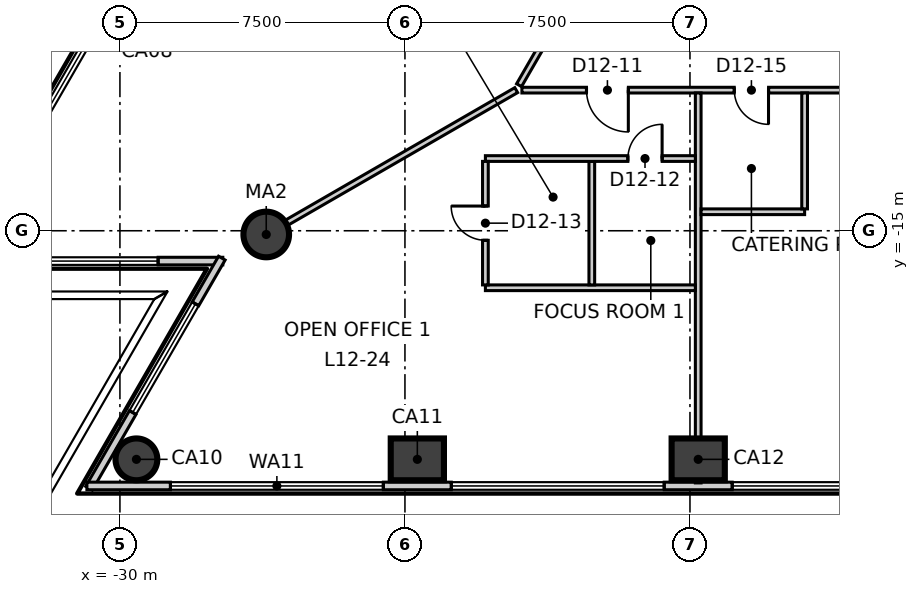
"""IFC4 building model, lengths in metres.
Left out: names, types, materials, properties, quantities, classifications, styles, units other than length and angle.
Written with IfcOpenShell. Run it as: python <this file> out.ifc"""

import sys

from ifc_helpers import new_model, si_unit, direction, frame, frame_2d, origin, origin_2d, place, context, subcontext, project, spatial, rectangle, circle, extrude, element, fill, save


model = new_model("IFC4")
c1 = context("Model", 3, precision=1e-05, world=origin(), true_north=direction((0.0, 1.0)))
c2 = subcontext(c1, "Body", "Model", "MODEL_VIEW")
j1 = project(units=[si_unit("LENGTHUNIT", "METRE"), si_unit("PLANEANGLEUNIT", "RADIAN")], contexts=[c1])
p1 = place(None, origin())
s1 = spatial("IfcSite", under=j1, at=p1, CompositionType="ELEMENT")
p2 = place(p1, origin())
s2 = spatial("IfcBuilding", under=s1, at=p2, CompositionType="ELEMENT")
p3 = place(p2, frame((0.0, 0.0, 59.3)))
s3 = spatial("IfcBuildingStorey", under=s2, at=p3, CompositionType="ELEMENT", Elevation=59.3)
p4 = place(p3, frame((-29.566, -21.015, -0.3), z_axis=(0.0, 0.0, 1.0), x_axis=(1.0, 0.0, 0.0)))
e1 = element("IfcColumn", 1, at=p4, inside=s3, PredefinedType="COLUMN", context=c2, shape_type="SweptSolid", body=[
    extrude(circle(Radius=0.55, at=origin_2d()), origin(), (0.0, 0.0, 1.0), 4.0),
])
for number, where, z_axis, x_axis in (
    (2, (-22.174, -21.015, -0.3), (0.0, 0.0, 1.0), (1.0, 0.0, 0.0)),
    (3, (-14.783, -21.015, -0.3), (0.0, 0.0, 1.0), (1.0, 0.0, 0.0)),
):
    element("IfcColumn", number, at=place(p3, frame(where, z_axis=z_axis, x_axis=x_axis)), inside=s3, PredefinedType="COLUMN", context=c2, shape_type="SweptSolid", body=[
        extrude(rectangle(XDim=1.4, YDim=1.1, at=origin_2d()), origin(), (0.0, 0.0, 1.0), 4.0),
    ])
p5 = place(p3, frame((-26.15, -15.098, -0.3), z_axis=(0.0, 0.0, 1.0), x_axis=(1.0, 0.0, 0.0)))
e4 = element("IfcColumn", 4, at=p5, inside=s3, PredefinedType="COLUMN", context=c2, shape_type="SweptSolid", body=[
    extrude(circle(Radius=0.6, at=origin_2d()), origin(), (0.0, 0.0, 1.0), 4.0),
])
p6 = place(p3, frame((-3.371, 37.591, 0.0), z_axis=(0.0, 0.0, 1.0), x_axis=(-0.500006313899, -0.866021758423, 0.0)))
e5 = element("IfcWall", 5, at=p6, inside=s3, PredefinedType="ELEMENTEDWALL", context=c2, shape_type="SweptSolid", body=[
    extrude(rectangle(XDim=61.719, YDim=0.2, at=frame_2d((30.859, 0.0))), origin(), (0.0, 0.0, 1.0), 3.7),
])
p7 = place(p6, frame((2.198, 0.0, 0.9)))
e6 = element("IfcOpeningElement", 6, at=p7, cuts=e5, PredefinedType="OPENING", context=c2, shape_type="SweptSolid", body=[
    extrude(rectangle(XDim=5.6, YDim=2.5, at=frame_2d((2.8, 1.25))), frame((0.0, 0.11, 0.0), z_axis=(0.0, -1.0, 0.0), x_axis=(1.0, 0.0, 0.0)), (0.0, 0.0, 1.0), 0.22),
])
p8 = place(p6, frame((9.59, 0.0, 0.9)))
e7 = element("IfcOpeningElement", 7, at=p8, cuts=e5, PredefinedType="OPENING", context=c2, shape_type="SweptSolid", body=[
    extrude(rectangle(XDim=5.6, YDim=2.5, at=frame_2d((2.8, 1.25))), frame((0.0, 0.11, 0.0), z_axis=(0.0, -1.0, 0.0), x_axis=(1.0, 0.0, 0.0)), (0.0, 0.0, 1.0), 0.22),
])
p9 = place(p6, frame((16.982, 0.0, 0.9)))
e8 = element("IfcOpeningElement", 8, at=p9, cuts=e5, PredefinedType="OPENING", context=c2, shape_type="SweptSolid", body=[
    extrude(rectangle(XDim=5.6, YDim=2.5, at=frame_2d((2.8, 1.25))), frame((0.0, 0.11, 0.0), z_axis=(0.0, -1.0, 0.0), x_axis=(1.0, 0.0, 0.0)), (0.0, 0.0, 1.0), 0.22),
])
p10 = place(p6, frame((24.373, 0.0, 0.9)))
e9 = element("IfcOpeningElement", 9, at=p10, cuts=e5, PredefinedType="OPENING", context=c2, shape_type="SweptSolid", body=[
    extrude(rectangle(XDim=5.6, YDim=2.5, at=frame_2d((2.8, 1.25))), frame((0.0, 0.11, 0.0), z_axis=(0.0, -1.0, 0.0), x_axis=(1.0, 0.0, 0.0)), (0.0, 0.0, 1.0), 0.22),
])
p11 = place(p6, frame((31.765, 0.0, 0.9)))
e10 = element("IfcOpeningElement", 10, at=p11, cuts=e5, PredefinedType="OPENING", context=c2, shape_type="SweptSolid", body=[
    extrude(rectangle(XDim=5.6, YDim=2.5, at=frame_2d((2.8, 1.25))), frame((0.0, 0.11, 0.0), z_axis=(0.0, -1.0, 0.0), x_axis=(1.0, 0.0, 0.0)), (0.0, 0.0, 1.0), 0.22),
])
p12 = place(p6, frame((39.157, 0.0, 0.9)))
e11 = element("IfcOpeningElement", 11, at=p12, cuts=e5, PredefinedType="OPENING", context=c2, shape_type="SweptSolid", body=[
    extrude(rectangle(XDim=5.6, YDim=2.5, at=frame_2d((2.8, 1.25))), frame((0.0, 0.11, 0.0), z_axis=(0.0, -1.0, 0.0), x_axis=(1.0, 0.0, 0.0)), (0.0, 0.0, 1.0), 0.22),
])
p13 = place(p6, frame((46.548, 0.0, 0.9)))
e12 = element("IfcOpeningElement", 12, at=p13, cuts=e5, PredefinedType="OPENING", context=c2, shape_type="SweptSolid", body=[
    extrude(rectangle(XDim=5.6, YDim=2.5, at=frame_2d((2.8, 1.25))), frame((0.0, 0.11, 0.0), z_axis=(0.0, -1.0, 0.0), x_axis=(1.0, 0.0, 0.0)), (0.0, 0.0, 1.0), 0.22),
])
p14 = place(p6, frame((53.94, 0.0, 0.9)))
e13 = element("IfcOpeningElement", 13, at=p14, cuts=e5, PredefinedType="OPENING", context=c2, shape_type="SweptSolid", body=[
    extrude(rectangle(XDim=5.6, YDim=2.5, at=frame_2d((2.8, 1.25))), frame((0.0, 0.11, 0.0), z_axis=(0.0, -1.0, 0.0), x_axis=(1.0, 0.0, 0.0)), (0.0, 0.0, 1.0), 0.22),
])
p15 = place(p3, frame((-34.286, -15.798, 0.0), z_axis=(0.0, 0.0, 1.0), x_axis=(1.0, 0.0, 0.0)))
e14 = element("IfcWall", 14, at=p15, inside=s3, PredefinedType="ELEMENTEDWALL", context=c2, shape_type="SweptSolid", body=[
    extrude(rectangle(XDim=6.993, YDim=0.2, at=frame_2d((3.497, 0.0))), origin(), (0.0, 0.0, 1.0), 3.7),
])
p16 = place(p15, frame((1.99, 0.0, 0.9)))
e15 = element("IfcOpeningElement", 15, at=p16, cuts=e14, PredefinedType="OPENING", context=c2, shape_type="SweptSolid", body=[
    extrude(rectangle(XDim=3.3, YDim=2.5, at=frame_2d((1.65, 1.25))), frame((0.0, 0.11, 0.0), z_axis=(0.0, -1.0, 0.0), x_axis=(1.0, 0.0, 0.0)), (0.0, 0.0, 1.0), 0.22),
])
p17 = place(p3, frame((-27.318, -15.72, 0.0), z_axis=(0.0, 0.0, 1.0), x_axis=(-0.499943085557, -0.86605826086, 0.0)))
e16 = element("IfcWall", 16, at=p17, inside=s3, PredefinedType="ELEMENTEDWALL", context=c2, shape_type="SweptSolid", body=[
    extrude(rectangle(XDim=6.992, YDim=0.2, at=frame_2d((3.496, 0.0))), origin(), (0.0, 0.0, 1.0), 3.7),
])
p18 = place(p17, frame((1.39, 0.0, 0.9)))
e17 = element("IfcOpeningElement", 17, at=p18, cuts=e16, PredefinedType="OPENING", context=c2, shape_type="SweptSolid", body=[
    extrude(rectangle(XDim=3.3, YDim=2.5, at=frame_2d((1.65, 1.25))), frame((0.0, 0.11, 0.0), z_axis=(0.0, -1.0, 0.0), x_axis=(1.0, 0.0, 0.0)), (0.0, 0.0, 1.0), 0.22),
])
p19 = place(p3, frame((-30.869, -21.715, 0.0), z_axis=(0.0, 0.0, 1.0), x_axis=(1.0, 0.0, 0.0)))
e18 = element("IfcWall", 18, at=p19, inside=s3, PredefinedType="ELEMENTEDWALL", context=c2, shape_type="SweptSolid", body=[
    extrude(rectangle(XDim=61.718, YDim=0.2, at=frame_2d((30.859, 0.0))), origin(), (0.0, 0.0, 1.0), 3.7),
])
p20 = place(p19, frame((2.199, 0.0, 0.9)))
e19 = element("IfcOpeningElement", 19, at=p20, cuts=e18, PredefinedType="OPENING", context=c2, shape_type="SweptSolid", body=[
    extrude(rectangle(XDim=5.6, YDim=2.5, at=frame_2d((2.8, 1.25))), frame((0.0, 0.11, 0.0), z_axis=(0.0, -1.0, 0.0), x_axis=(1.0, 0.0, 0.0)), (0.0, 0.0, 1.0), 0.22),
])
p21 = place(p19, frame((9.59, 0.0, 0.9)))
e20 = element("IfcOpeningElement", 20, at=p21, cuts=e18, PredefinedType="OPENING", context=c2, shape_type="SweptSolid", body=[
    extrude(rectangle(XDim=5.6, YDim=2.5, at=frame_2d((2.8, 1.25))), frame((0.0, 0.11, 0.0), z_axis=(0.0, -1.0, 0.0), x_axis=(1.0, 0.0, 0.0)), (0.0, 0.0, 1.0), 0.22),
])
p22 = place(p19, frame((16.982, 0.0, 0.9)))
e21 = element("IfcOpeningElement", 21, at=p22, cuts=e18, PredefinedType="OPENING", context=c2, shape_type="SweptSolid", body=[
    extrude(rectangle(XDim=5.6, YDim=2.5, at=frame_2d((2.8, 1.25))), frame((0.0, 0.11, 0.0), z_axis=(0.0, -1.0, 0.0), x_axis=(1.0, 0.0, 0.0)), (0.0, 0.0, 1.0), 0.22),
])
p23 = place(p19, frame((24.373, 0.0, 0.9)))
e22 = element("IfcOpeningElement", 22, at=p23, cuts=e18, PredefinedType="OPENING", context=c2, shape_type="SweptSolid", body=[
    extrude(rectangle(XDim=5.6, YDim=2.5, at=frame_2d((2.8, 1.25))), frame((0.0, 0.11, 0.0), z_axis=(0.0, -1.0, 0.0), x_axis=(1.0, 0.0, 0.0)), (0.0, 0.0, 1.0), 0.22),
])
p24 = place(p19, frame((31.765, 0.0, 0.9)))
e23 = element("IfcOpeningElement", 23, at=p24, cuts=e18, PredefinedType="OPENING", context=c2, shape_type="SweptSolid", body=[
    extrude(rectangle(XDim=5.6, YDim=2.5, at=frame_2d((2.8, 1.25))), frame((0.0, 0.11, 0.0), z_axis=(0.0, -1.0, 0.0), x_axis=(1.0, 0.0, 0.0)), (0.0, 0.0, 1.0), 0.22),
])
p25 = place(p19, frame((39.156, 0.0, 0.9)))
e24 = element("IfcOpeningElement", 24, at=p25, cuts=e18, PredefinedType="OPENING", context=c2, shape_type="SweptSolid", body=[
    extrude(rectangle(XDim=5.6, YDim=2.5, at=frame_2d((2.8, 1.25))), frame((0.0, 0.11, 0.0), z_axis=(0.0, -1.0, 0.0), x_axis=(1.0, 0.0, 0.0)), (0.0, 0.0, 1.0), 0.22),
])
p26 = place(p19, frame((46.548, 0.0, 0.9)))
e25 = element("IfcOpeningElement", 25, at=p26, cuts=e18, PredefinedType="OPENING", context=c2, shape_type="SweptSolid", body=[
    extrude(rectangle(XDim=5.6, YDim=2.5, at=frame_2d((2.8, 1.25))), frame((0.0, 0.11, 0.0), z_axis=(0.0, -1.0, 0.0), x_axis=(1.0, 0.0, 0.0)), (0.0, 0.0, 1.0), 0.22),
])
p27 = place(p19, frame((53.939, 0.0, 0.9)))
e26 = element("IfcOpeningElement", 26, at=p27, cuts=e18, PredefinedType="OPENING", context=c2, shape_type="SweptSolid", body=[
    extrude(rectangle(XDim=5.6, YDim=2.5, at=frame_2d((2.8, 1.25))), frame((0.0, 0.11, 0.0), z_axis=(0.0, -1.0, 0.0), x_axis=(1.0, 0.0, 0.0)), (0.0, 0.0, 1.0), 0.22),
])
p28 = place(p3, frame((-26.687, -15.408, 0.0), z_axis=(0.0, 0.0, 1.0), x_axis=(0.866021786635, 0.500006265035, 0.0)))
e27 = element("IfcWall", 27, at=p28, inside=s3, PredefinedType="PARTITIONING", context=c2, shape_type="SweptSolid", body=[
    extrude(rectangle(XDim=8.216, YDim=0.15, at=frame_2d((4.108, 0.0))), origin(), (0.0, 0.0, 1.0), 3.1),
])
p29 = place(p3, frame((-19.497, -11.17, 0.0), z_axis=(0.0, 0.0, 1.0), x_axis=(0.499998854553, 0.866026065108, 0.0)))
e28 = element("IfcWall", 28, at=p29, inside=s3, PredefinedType="PARTITIONING", context=c2, shape_type="SweptSolid", body=[
    extrude(rectangle(XDim=38.994, YDim=0.15, at=frame_2d((19.497, 0.0))), origin(), (0.0, 0.0, 1.0), 3.7),
])
p30 = place(p29, frame((36.044, 0.0, 0.0)))
e29 = element("IfcOpeningElement", 29, at=p30, cuts=e28, PredefinedType="OPENING", context=c2, shape_type="SweptSolid", body=[
    extrude(rectangle(XDim=1.1, YDim=2.1, at=frame_2d((0.55, 1.05))), frame((0.0, 0.085, 0.0), z_axis=(0.0, -1.0, 0.0), x_axis=(1.0, 0.0, 0.0)), (0.0, 0.0, 1.0), 0.17),
])
p31 = place(p29, frame((21.855, 0.0, 0.0)))
e30 = element("IfcOpeningElement", 30, at=p31, cuts=e28, PredefinedType="OPENING", context=c2, shape_type="SweptSolid", body=[
    extrude(rectangle(XDim=1.1, YDim=2.1, at=frame_2d((0.55, 1.05))), frame((0.0, 0.085, 0.0), z_axis=(0.0, -1.0, 0.0), x_axis=(1.0, 0.0, 0.0)), (0.0, 0.0, 1.0), 0.17),
])
p32 = place(p29, frame((32.155, 0.0, 0.0)))
e31 = element("IfcOpeningElement", 31, at=p32, cuts=e28, PredefinedType="OPENING", context=c2, shape_type="SweptSolid", body=[
    extrude(rectangle(XDim=0.9, YDim=2.1, at=frame_2d((0.45, 1.05))), frame((0.0, 0.085, 0.0), z_axis=(0.0, -1.0, 0.0), x_axis=(1.0, 0.0, 0.0)), (0.0, 0.0, 1.0), 0.17),
])
p33 = place(p29, frame((28.955, 0.0, 0.0)))
e32 = element("IfcOpeningElement", 32, at=p33, cuts=e28, PredefinedType="OPENING", context=c2, shape_type="SweptSolid", body=[
    extrude(rectangle(XDim=0.9, YDim=2.1, at=frame_2d((0.45, 1.05))), frame((0.0, 0.085, 0.0), z_axis=(0.0, -1.0, 0.0), x_axis=(1.0, 0.0, 0.0)), (0.0, 0.0, 1.0), 0.17),
])
p34 = place(p29, frame((26.055, 0.0, 0.0)))
e33 = element("IfcOpeningElement", 33, at=p34, cuts=e28, PredefinedType="OPENING", context=c2, shape_type="SweptSolid", body=[
    extrude(rectangle(XDim=1.0, YDim=2.1, at=frame_2d((0.5, 1.05))), frame((0.0, 0.085, 0.0), z_axis=(0.0, -1.0, 0.0), x_axis=(1.0, 0.0, 0.0)), (0.0, 0.0, 1.0), 0.17),
])
p35 = place(p29, frame((10.373, 0.0, 0.0)))
e34 = element("IfcOpeningElement", 34, at=p35, cuts=e28, PredefinedType="OPENING", context=c2, shape_type="SweptSolid", body=[
    extrude(rectangle(XDim=1.0, YDim=2.1, at=frame_2d((0.5, 1.05))), frame((0.0, 0.085, 0.0), z_axis=(0.0, -1.0, 0.0), x_axis=(1.0, 0.0, 0.0)), (0.0, 0.0, 1.0), 0.17),
])
p36 = place(p29, frame((17.773, 0.0, 0.0)))
e35 = element("IfcOpeningElement", 35, at=p36, cuts=e28, PredefinedType="OPENING", context=c2, shape_type="SweptSolid", body=[
    extrude(rectangle(XDim=0.9, YDim=2.1, at=frame_2d((0.45, 1.05))), frame((0.0, 0.085, 0.0), z_axis=(0.0, -1.0, 0.0), x_axis=(1.0, 0.0, 0.0)), (0.0, 0.0, 1.0), 0.17),
])
p37 = place(p29, frame((1.689, 0.0, 0.0)))
e36 = element("IfcOpeningElement", 36, at=p37, cuts=e28, PredefinedType="OPENING", context=c2, shape_type="SweptSolid", body=[
    extrude(rectangle(XDim=1.1, YDim=2.1, at=frame_2d((0.55, 1.05))), frame((0.0, 0.085, 0.0), z_axis=(0.0, -1.0, 0.0), x_axis=(1.0, 0.0, 0.0)), (0.0, 0.0, 1.0), 0.17),
])
p38 = place(p3, frame((-19.422, -11.3, 0.0), z_axis=(0.0, 0.0, 1.0), x_axis=(1.0, 0.0, 0.0)))
e37 = element("IfcWall", 37, at=p38, inside=s3, PredefinedType="PARTITIONING", context=c2, shape_type="SweptSolid", body=[
    extrude(rectangle(XDim=38.994, YDim=0.15, at=frame_2d((19.497, 0.0))), origin(), (0.0, 0.0, 1.0), 3.7),
])
p39 = place(p38, frame((1.7, 0.0, 0.0)))
e38 = element("IfcOpeningElement", 38, at=p39, cuts=e37, PredefinedType="OPENING", context=c2, shape_type="SweptSolid", body=[
    extrude(rectangle(XDim=1.1, YDim=2.1, at=frame_2d((0.55, 1.05))), frame((0.0, 0.085, 0.0), z_axis=(0.0, -1.0, 0.0), x_axis=(1.0, 0.0, 0.0)), (0.0, 0.0, 1.0), 0.17),
])
p40 = place(p38, frame((12.889, 0.0, 0.0)))
e39 = element("IfcOpeningElement", 39, at=p40, cuts=e37, PredefinedType="OPENING", context=c2, shape_type="SweptSolid", body=[
    extrude(rectangle(XDim=1.0, YDim=2.1, at=frame_2d((0.5, 1.05))), frame((0.0, 0.085, 0.0), z_axis=(0.0, -1.0, 0.0), x_axis=(1.0, 0.0, 0.0)), (0.0, 0.0, 1.0), 0.17),
])
p41 = place(p38, frame((5.589, 0.0, 0.0)))
e40 = element("IfcOpeningElement", 40, at=p41, cuts=e37, PredefinedType="OPENING", context=c2, shape_type="SweptSolid", body=[
    extrude(rectangle(XDim=0.9, YDim=2.1, at=frame_2d((0.45, 1.05))), frame((0.0, 0.085, 0.0), z_axis=(0.0, -1.0, 0.0), x_axis=(1.0, 0.0, 0.0)), (0.0, 0.0, 1.0), 0.17),
])
p42 = place(p38, frame((29.272, 0.0, 0.0)))
e41 = element("IfcOpeningElement", 41, at=p42, cuts=e37, PredefinedType="OPENING", context=c2, shape_type="SweptSolid", body=[
    extrude(rectangle(XDim=1.1, YDim=2.1, at=frame_2d((0.55, 1.05))), frame((0.0, 0.085, 0.0), z_axis=(0.0, -1.0, 0.0), x_axis=(1.0, 0.0, 0.0)), (0.0, 0.0, 1.0), 0.17),
])
p43 = place(p38, frame((20.772, 0.0, 0.0)))
e42 = element("IfcOpeningElement", 42, at=p43, cuts=e37, PredefinedType="OPENING", context=c2, shape_type="SweptSolid", body=[
    extrude(rectangle(XDim=0.9, YDim=2.1, at=frame_2d((0.45, 1.05))), frame((0.0, 0.085, 0.0), z_axis=(0.0, -1.0, 0.0), x_axis=(1.0, 0.0, 0.0)), (0.0, 0.0, 1.0), 0.17),
])
p44 = place(p38, frame((23.772, 0.0, 0.0)))
e43 = element("IfcOpeningElement", 43, at=p44, cuts=e37, PredefinedType="OPENING", context=c2, shape_type="SweptSolid", body=[
    extrude(rectangle(XDim=0.9, YDim=2.1, at=frame_2d((0.45, 1.05))), frame((0.0, 0.085, 0.0), z_axis=(0.0, -1.0, 0.0), x_axis=(1.0, 0.0, 0.0)), (0.0, 0.0, 1.0), 0.17),
])
p45 = place(p38, frame((36.055, 0.0, 0.0)))
e44 = element("IfcOpeningElement", 44, at=p45, cuts=e37, PredefinedType="OPENING", context=c2, shape_type="SweptSolid", body=[
    extrude(rectangle(XDim=1.1, YDim=2.1, at=frame_2d((0.55, 1.05))), frame((0.0, 0.085, 0.0), z_axis=(0.0, -1.0, 0.0), x_axis=(1.0, 0.0, 0.0)), (0.0, 0.0, 1.0), 0.17),
])
p46 = place(p3, frame((-14.783, -21.635, 0.0), z_axis=(0.0, 0.0, 1.0), x_axis=(0.0, 1.0, 0.0)))
e45 = element("IfcWall", 45, at=p46, inside=s3, PredefinedType="PARTITIONING", context=c2, shape_type="SweptSolid", body=[
    extrude(rectangle(XDim=10.26, YDim=0.15, at=frame_2d((5.13, 0.0))), origin(), (0.0, 0.0, 1.0), 3.7),
])
p47 = place(p3, frame((-14.708, -14.5, 0.0), z_axis=(0.0, 0.0, 1.0), x_axis=(1.0, 0.0, 0.0)))
e46 = element("IfcWall", 46, at=p47, inside=s3, PredefinedType="PARTITIONING", context=c2, shape_type="SweptSolid", body=[
    extrude(rectangle(XDim=2.725, YDim=0.15, at=frame_2d((1.363, 0.0))), origin(), (0.0, 0.0, 1.0), 3.7),
])
p48 = place(p3, frame((-11.983, -14.425, 0.0), z_axis=(0.0, 0.0, 1.0), x_axis=(0.0, 1.0, 0.0)))
e47 = element("IfcWall", 47, at=p48, inside=s3, PredefinedType="PARTITIONING", context=c2, shape_type="SweptSolid", body=[
    extrude(rectangle(XDim=3.05, YDim=0.15, at=frame_2d((1.525, 0.0))), origin(), (0.0, 0.0, 1.0), 3.7),
])
p49 = place(p3, frame((-20.383, -16.5, 0.0), z_axis=(0.0, 0.0, 1.0), x_axis=(1.0, 0.0, 0.0)))
e48 = element("IfcWall", 48, at=p49, inside=s3, PredefinedType="PARTITIONING", context=c2, shape_type="SweptSolid", body=[
    extrude(rectangle(XDim=5.525, YDim=0.15, at=frame_2d((2.763, 0.0))), origin(), (0.0, 0.0, 1.0), 3.7),
])
p50 = place(p3, frame((-17.583, -16.425, 0.0), z_axis=(0.0, 0.0, 1.0), x_axis=(0.0, 1.0, 0.0)))
e49 = element("IfcWall", 49, at=p50, inside=s3, PredefinedType="PARTITIONING", context=c2, shape_type="SweptSolid", body=[
    extrude(rectangle(XDim=3.25, YDim=0.15, at=frame_2d((1.625, 0.0))), origin(), (0.0, 0.0, 1.0), 3.7),
])
p51 = place(p3, frame((-20.383, -13.1, 0.0), z_axis=(0.0, 0.0, 1.0), x_axis=(1.0, 0.0, 0.0)))
e50 = element("IfcWall", 50, at=p51, inside=s3, PredefinedType="PARTITIONING", context=c2, shape_type="SweptSolid", body=[
    extrude(rectangle(XDim=5.525, YDim=0.15, at=frame_2d((2.763, 0.0))), origin(), (0.0, 0.0, 1.0), 3.7),
])
p52 = place(p51, frame((3.75, 0.0, 0.0)))
e51 = element("IfcOpeningElement", 51, at=p52, cuts=e50, PredefinedType="OPENING", context=c2, shape_type="SweptSolid", body=[
    extrude(rectangle(XDim=0.9, YDim=2.1, at=frame_2d((0.45, 1.05))), frame((0.0, 0.085, 0.0), z_axis=(0.0, -1.0, 0.0), x_axis=(1.0, 0.0, 0.0)), (0.0, 0.0, 1.0), 0.17),
])
p53 = place(p3, frame((-20.383, -16.425, 0.0), z_axis=(0.0, 0.0, 1.0), x_axis=(0.0, 1.0, 0.0)))
e52 = element("IfcWall", 52, at=p53, inside=s3, PredefinedType="PARTITIONING", context=c2, shape_type="SweptSolid", body=[
    extrude(rectangle(XDim=3.25, YDim=0.15, at=frame_2d((1.625, 0.0))), origin(), (0.0, 0.0, 1.0), 3.7),
])
p54 = place(p53, frame((1.175, 0.0, 0.0)))
e53 = element("IfcOpeningElement", 53, at=p54, cuts=e52, PredefinedType="OPENING", context=c2, shape_type="SweptSolid", body=[
    extrude(rectangle(XDim=0.9, YDim=2.1, at=frame_2d((0.45, 1.05))), frame((0.0, 0.085, 0.0), z_axis=(0.0, -1.0, 0.0), x_axis=(1.0, 0.0, 0.0)), (0.0, 0.0, 1.0), 0.17),
])
p55 = place(p14, origin())
e54 = element("IfcWindow", 54, at=p55, inside=s3, PartitioningType="SINGLE_PANEL", PredefinedType="WINDOW", context=c2, shape_type="SweptSolid", body=[
    extrude(rectangle(XDim=5.6, YDim=2.5, at=frame_2d((2.8, 1.25))), frame((0.0, 0.03, 0.0), z_axis=(0.0, -1.0, 0.0), x_axis=(1.0, 0.0, 0.0)), (0.0, 0.0, 1.0), 0.06),
])
fill(e13, e54)
p56 = place(p16, origin())
e55 = element("IfcWindow", 55, at=p56, inside=s3, PartitioningType="SINGLE_PANEL", PredefinedType="WINDOW", context=c2, shape_type="SweptSolid", body=[
    extrude(rectangle(XDim=3.3, YDim=2.5, at=frame_2d((1.65, 1.25))), frame((0.0, 0.03, 0.0), z_axis=(0.0, -1.0, 0.0), x_axis=(1.0, 0.0, 0.0)), (0.0, 0.0, 1.0), 0.06),
])
fill(e15, e55)
p57 = place(p18, origin())
e56 = element("IfcWindow", 56, at=p57, inside=s3, PartitioningType="SINGLE_PANEL", PredefinedType="WINDOW", context=c2, shape_type="SweptSolid", body=[
    extrude(rectangle(XDim=3.3, YDim=2.5, at=frame_2d((1.65, 1.25))), frame((0.0, 0.03, 0.0), z_axis=(0.0, -1.0, 0.0), x_axis=(1.0, 0.0, 0.0)), (0.0, 0.0, 1.0), 0.06),
])
fill(e17, e56)
p58 = place(p20, origin())
e57 = element("IfcWindow", 57, at=p58, inside=s3, PartitioningType="SINGLE_PANEL", PredefinedType="WINDOW", context=c2, shape_type="SweptSolid", body=[
    extrude(rectangle(XDim=5.6, YDim=2.5, at=frame_2d((2.8, 1.25))), frame((0.0, 0.03, 0.0), z_axis=(0.0, -1.0, 0.0), x_axis=(1.0, 0.0, 0.0)), (0.0, 0.0, 1.0), 0.06),
])
fill(e19, e57)
p59 = place(p21, origin())
e58 = element("IfcWindow", 58, at=p59, inside=s3, PartitioningType="SINGLE_PANEL", PredefinedType="WINDOW", context=c2, shape_type="SweptSolid", body=[
    extrude(rectangle(XDim=5.6, YDim=2.5, at=frame_2d((2.8, 1.25))), frame((0.0, 0.03, 0.0), z_axis=(0.0, -1.0, 0.0), x_axis=(1.0, 0.0, 0.0)), (0.0, 0.0, 1.0), 0.06),
])
fill(e20, e58)
p60 = place(p22, origin())
e59 = element("IfcWindow", 59, at=p60, inside=s3, PartitioningType="SINGLE_PANEL", PredefinedType="WINDOW", context=c2, shape_type="SweptSolid", body=[
    extrude(rectangle(XDim=5.6, YDim=2.5, at=frame_2d((2.8, 1.25))), frame((0.0, 0.03, 0.0), z_axis=(0.0, -1.0, 0.0), x_axis=(1.0, 0.0, 0.0)), (0.0, 0.0, 1.0), 0.06),
])
fill(e21, e59)
p61 = place(p39, origin())
e60 = element("IfcDoor", 60, at=p61, inside=s3, OperationType="SINGLE_SWING_RIGHT", PredefinedType="DOOR", context=c2, shape_type="SweptSolid", body=[
    extrude(rectangle(XDim=1.1, YDim=2.1, at=frame_2d((0.55, 1.05))), frame((0.0, 0.025, 0.0), z_axis=(0.0, -1.0, 0.0), x_axis=(1.0, 0.0, 0.0)), (0.0, 0.0, 1.0), 0.05),
])
fill(e38, e60)
p62 = place(p52, origin())
e61 = element("IfcDoor", 61, at=p62, inside=s3, OperationType="SINGLE_SWING_LEFT", PredefinedType="DOOR", context=c2, shape_type="SweptSolid", body=[
    extrude(rectangle(XDim=0.9, YDim=2.1, at=frame_2d((0.45, 1.05))), frame((0.0, 0.025, 0.0), z_axis=(0.0, -1.0, 0.0), x_axis=(1.0, 0.0, 0.0)), (0.0, 0.0, 1.0), 0.05),
])
fill(e51, e61)
p63 = place(p54, origin())
e62 = element("IfcDoor", 62, at=p63, inside=s3, OperationType="SINGLE_SWING_LEFT", PredefinedType="DOOR", context=c2, shape_type="SweptSolid", body=[
    extrude(rectangle(XDim=0.9, YDim=2.1, at=frame_2d((0.45, 1.05))), frame((0.0, 0.025, 0.0), z_axis=(0.0, -1.0, 0.0), x_axis=(1.0, 0.0, 0.0)), (0.0, 0.0, 1.0), 0.05),
])
fill(e53, e62)
p64 = place(p41, origin())
e63 = element("IfcDoor", 63, at=p64, inside=s3, OperationType="SINGLE_SWING_RIGHT", PredefinedType="DOOR", context=c2, shape_type="SweptSolid", body=[
    extrude(rectangle(XDim=0.9, YDim=2.1, at=frame_2d((0.45, 1.05))), frame((0.0, 0.025, 0.0), z_axis=(0.0, -1.0, 0.0), x_axis=(1.0, 0.0, 0.0)), (0.0, 0.0, 1.0), 0.05),
])
fill(e40, e63)
save(model, sys.argv[1])
